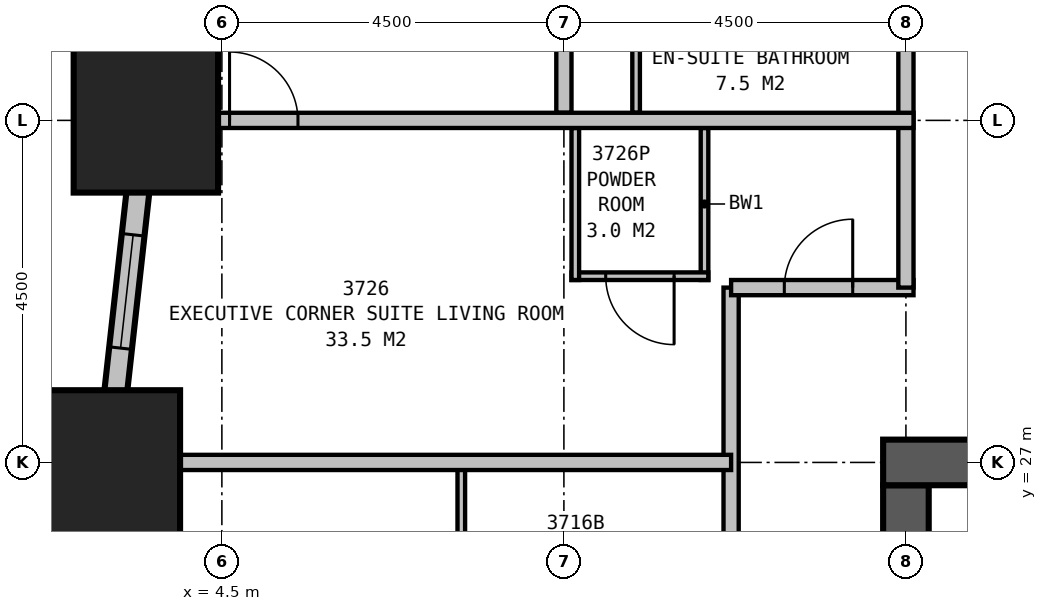
"""IFC4 building model, lengths in metres.
Left out: names, types, materials, properties, quantities, classifications, styles, units other than length and angle.
Written with IfcOpenShell. Run it as: python <this file> out.ifc"""

import sys

from ifc_helpers import new_model, si_unit, direction, frame, frame_2d, origin, origin_2d, place, context, subcontext, project, spatial, rectangle, extrude, element, fill, save


model = new_model("IFC4")
c1 = context("Model", 3, precision=1e-05, world=origin(), true_north=direction((0.0, 1.0)))
c2 = subcontext(c1, "Body", "Model", "MODEL_VIEW")
j1 = project(units=[si_unit("LENGTHUNIT", "METRE"), si_unit("PLANEANGLEUNIT", "RADIAN")], contexts=[c1])
p1 = place(None, origin())
s1 = spatial("IfcSite", under=j1, at=p1, CompositionType="ELEMENT")
p2 = place(p1, origin())
s2 = spatial("IfcBuilding", under=s1, at=p2, CompositionType="ELEMENT")
p3 = place(p2, frame((0.0, 0.0, 142.4)))
s3 = spatial("IfcBuildingStorey", under=s2, at=p3, CompositionType="ELEMENT", Elevation=142.4)
for number, where, z_axis, x_axis in (
    (1, (3.5, 31.5, 0.0), (0.0, 0.0, 1.0), (1.0, 0.0, 0.0)),
    (2, (3.0, 27.0, 0.0), (0.0, 0.0, 1.0), (1.0, 0.0, 0.0)),
):
    element("IfcColumn", number, at=place(p3, frame(where, z_axis=z_axis, x_axis=x_axis)), inside=s3, PredefinedType="COLUMN", context=c2, shape_type="SweptSolid", body=[
        extrude(rectangle(XDim=1.9, YDim=1.9, at=origin_2d()), origin(), (0.0, 0.0, 1.0), 3.5),
    ])
p4 = place(p3, frame((36.3, 27.0, 0.0), z_axis=(0.0, 0.0, 1.0), x_axis=(-1.0, 0.0, 0.0)))
e3 = element("IfcWall", 3, at=p4, inside=s3, PredefinedType="SHEAR", context=c2, shape_type="SweptSolid", body=[
    extrude(rectangle(XDim=23.1, YDim=0.6, at=frame_2d((11.55, 0.0))), origin(), (0.0, 0.0, 1.0), 3.5),
])
p5 = place(p4, frame((17.05, 0.0, 0.0)))
e4 = element("IfcOpeningElement", 4, at=p5, cuts=e3, PredefinedType="OPENING", context=c2, shape_type="SweptSolid", body=[
    extrude(rectangle(XDim=1.0, YDim=2.1, at=frame_2d((0.5, 1.05))), frame((0.0, 0.31, 0.0), z_axis=(0.0, -1.0, 0.0), x_axis=(1.0, 0.0, 0.0)), (0.0, 0.0, 1.0), 0.62),
])
p6 = place(p4, frame((12.05, 0.0, 0.0)))
e5 = element("IfcOpeningElement", 5, at=p6, cuts=e3, PredefinedType="OPENING", context=c2, shape_type="SweptSolid", body=[
    extrude(rectangle(XDim=1.0, YDim=2.1, at=frame_2d((0.5, 1.05))), frame((0.0, 0.31, 0.0), z_axis=(0.0, -1.0, 0.0), x_axis=(1.0, 0.0, 0.0)), (0.0, 0.0, 1.0), 0.62),
])
p7 = place(p4, frame((7.05, 0.0, 0.0)))
e6 = element("IfcOpeningElement", 6, at=p7, cuts=e3, PredefinedType="OPENING", context=c2, shape_type="SweptSolid", body=[
    extrude(rectangle(XDim=1.0, YDim=2.1, at=frame_2d((0.5, 1.05))), frame((0.0, 0.31, 0.0), z_axis=(0.0, -1.0, 0.0), x_axis=(1.0, 0.0, 0.0)), (0.0, 0.0, 1.0), 0.62),
])
p8 = place(p3, frame((13.5, 26.7, 0.0), z_axis=(0.0, 0.0, 1.0), x_axis=(0.0, -1.0, 0.0)))
e7 = element("IfcWall", 7, at=p8, inside=s3, PredefinedType="SHEAR", context=c2, shape_type="SweptSolid", body=[
    extrude(rectangle(XDim=6.7, YDim=0.6, at=frame_2d((3.35, 0.0))), origin(), (0.0, 0.0, 1.0), 3.5),
])
p9 = place(p3, frame((4.017, 36.149, 0.0), z_axis=(0.0, 0.0, 1.0), x_axis=(-0.110433201132, -0.993883548555, 0.0)))
e8 = element("IfcWall", 8, at=p9, inside=s3, PredefinedType="STANDARD", context=c2, shape_type="SweptSolid", body=[
    extrude(rectangle(XDim=31.994, YDim=0.3, at=frame_2d((15.997, 0.0))), origin(), (0.0, 0.0, 1.0), 2.1),
])
p10 = place(p9, frame((1.664, 0.0, 0.5)))
e9 = element("IfcOpeningElement", 9, at=p10, cuts=e8, PredefinedType="OPENING", context=c2, shape_type="SweptSolid", body=[
    extrude(rectangle(XDim=1.5, YDim=1.4, at=frame_2d((0.75, 0.7))), frame((0.0, 0.16, 0.0), z_axis=(0.0, -1.0, 0.0), x_axis=(1.0, 0.0, 0.0)), (0.0, 0.0, 1.0), 0.32),
])
p11 = place(p9, frame((6.192, 0.0, 0.5)))
e10 = element("IfcOpeningElement", 10, at=p11, cuts=e8, PredefinedType="OPENING", context=c2, shape_type="SweptSolid", body=[
    extrude(rectangle(XDim=1.5, YDim=1.4, at=frame_2d((0.75, 0.7))), frame((0.0, 0.16, 0.0), z_axis=(0.0, -1.0, 0.0), x_axis=(1.0, 0.0, 0.0)), (0.0, 0.0, 1.0), 0.32),
])
p12 = place(p9, frame((10.719, 0.0, 0.5)))
e11 = element("IfcOpeningElement", 11, at=p12, cuts=e8, PredefinedType="OPENING", context=c2, shape_type="SweptSolid", body=[
    extrude(rectangle(XDim=1.5, YDim=1.4, at=frame_2d((0.75, 0.7))), frame((0.0, 0.16, 0.0), z_axis=(0.0, -1.0, 0.0), x_axis=(1.0, 0.0, 0.0)), (0.0, 0.0, 1.0), 0.32),
])
p13 = place(p9, frame((15.247, 0.0, 0.5)))
e12 = element("IfcOpeningElement", 12, at=p13, cuts=e8, PredefinedType="OPENING", context=c2, shape_type="SweptSolid", body=[
    extrude(rectangle(XDim=1.5, YDim=1.4, at=frame_2d((0.75, 0.7))), frame((0.0, 0.16, 0.0), z_axis=(0.0, -1.0, 0.0), x_axis=(1.0, 0.0, 0.0)), (0.0, 0.0, 1.0), 0.32),
])
p14 = place(p9, frame((19.775, 0.0, 0.5)))
e13 = element("IfcOpeningElement", 13, at=p14, cuts=e8, PredefinedType="OPENING", context=c2, shape_type="SweptSolid", body=[
    extrude(rectangle(XDim=1.5, YDim=1.4, at=frame_2d((0.75, 0.7))), frame((0.0, 0.16, 0.0), z_axis=(0.0, -1.0, 0.0), x_axis=(1.0, 0.0, 0.0)), (0.0, 0.0, 1.0), 0.32),
])
p15 = place(p9, frame((24.302, 0.0, 0.5)))
e14 = element("IfcOpeningElement", 14, at=p15, cuts=e8, PredefinedType="OPENING", context=c2, shape_type="SweptSolid", body=[
    extrude(rectangle(XDim=1.5, YDim=1.4, at=frame_2d((0.75, 0.7))), frame((0.0, 0.16, 0.0), z_axis=(0.0, -1.0, 0.0), x_axis=(1.0, 0.0, 0.0)), (0.0, 0.0, 1.0), 0.32),
])
p16 = place(p9, frame((28.83, 0.0, 0.5)))
e15 = element("IfcOpeningElement", 15, at=p16, cuts=e8, PredefinedType="OPENING", context=c2, shape_type="SweptSolid", body=[
    extrude(rectangle(XDim=1.5, YDim=1.4, at=frame_2d((0.75, 0.7))), frame((0.0, 0.16, 0.0), z_axis=(0.0, -1.0, 0.0), x_axis=(1.0, 0.0, 0.0)), (0.0, 0.0, 1.0), 0.32),
])
p17 = place(p3, frame((11.2, 29.3, 0.0), z_axis=(0.0, 0.0, 1.0), x_axis=(1.0, 0.0, 0.0)))
e16 = element("IfcWall", 16, at=p17, inside=s3, PredefinedType="PARTITIONING", context=c2, shape_type="SweptSolid", body=[
    extrude(rectangle(XDim=2.4, YDim=0.2, at=frame_2d((1.2, 0.0))), origin(), (0.0, 0.0, 1.0), 3.25),
])
p18 = place(p17, frame((0.7, 0.0, 0.0)))
e17 = element("IfcOpeningElement", 17, at=p18, cuts=e16, PredefinedType="OPENING", context=c2, shape_type="SweptSolid", body=[
    extrude(rectangle(XDim=0.9, YDim=2.1, at=frame_2d((0.45, 1.05))), frame((0.0, 0.11, 0.0), z_axis=(0.0, -1.0, 0.0), x_axis=(1.0, 0.0, 0.0)), (0.0, 0.0, 1.0), 0.22),
])
p19 = place(p3, frame((11.2, 11.2, 0.0), z_axis=(0.0, 0.0, 1.0), x_axis=(0.0, 1.0, 0.0)))
e18 = element("IfcWall", 18, at=p19, inside=s3, PredefinedType="PARTITIONING", context=c2, shape_type="SweptSolid", body=[
    extrude(rectangle(XDim=18.1, YDim=0.2, at=frame_2d((9.05, 0.0))), origin(), (0.0, 0.0, 1.0), 3.25),
])
p20 = place(p19, frame((3.2, 0.0, 0.0)))
e19 = element("IfcOpeningElement", 19, at=p20, cuts=e18, PredefinedType="OPENING", context=c2, shape_type="SweptSolid", body=[
    extrude(rectangle(XDim=1.0, YDim=2.1, at=frame_2d((0.5, 1.05))), frame((0.0, 0.11, 0.0), z_axis=(0.0, -1.0, 0.0), x_axis=(1.0, 0.0, 0.0)), (0.0, 0.0, 1.0), 0.22),
])
p21 = place(p19, frame((7.65, 0.0, 0.0)))
e20 = element("IfcOpeningElement", 20, at=p21, cuts=e18, PredefinedType="OPENING", context=c2, shape_type="SweptSolid", body=[
    extrude(rectangle(XDim=0.9, YDim=2.1, at=frame_2d((0.45, 1.05))), frame((0.0, 0.11, 0.0), z_axis=(0.0, -1.0, 0.0), x_axis=(1.0, 0.0, 0.0)), (0.0, 0.0, 1.0), 0.22),
])
p22 = place(p3, frame((7.65, 24.0, 0.0), z_axis=(0.0, 0.0, 1.0), x_axis=(0.0, 1.0, 0.0)))
e21 = element("IfcWall", 21, at=p22, inside=s3, PredefinedType="PLUMBINGWALL", context=c2, shape_type="SweptSolid", body=[
    extrude(rectangle(XDim=3.0, YDim=0.1, at=frame_2d((1.5, 0.0))), origin(), (0.0, 0.0, 1.0), 3.25),
])
p23 = place(p3, frame((11.2, 27.0, 0.0), z_axis=(0.0, 0.0, 1.0), x_axis=(-1.0, 0.0, 0.0)))
e22 = element("IfcWall", 22, at=p23, inside=s3, PredefinedType="PARTITIONING", context=c2, shape_type="SweptSolid", body=[
    extrude(rectangle(XDim=7.977, YDim=0.2, at=frame_2d((3.988, 0.0))), origin(), (0.0, 0.0, 1.0), 1.9),
])
p24 = place(p3, frame((13.5, 29.3, 0.0), z_axis=(0.0, 0.0, 1.0), x_axis=(0.0, 1.0, 0.0)))
e23 = element("IfcWall", 23, at=p24, inside=s3, PredefinedType="PARTITIONING", context=c2, shape_type="SweptSolid", body=[
    extrude(rectangle(XDim=11.2, YDim=0.2, at=frame_2d((5.6, 0.0))), origin(), (0.0, 0.0, 1.0), 2.2),
])
p25 = place(p3, frame((13.6, 31.5, 0.0), z_axis=(0.0, 0.0, 1.0), x_axis=(-1.0, 0.0, 0.0)))
e24 = element("IfcWall", 24, at=p25, inside=s3, PredefinedType="PARTITIONING", context=c2, shape_type="SweptSolid", body=[
    extrude(rectangle(XDim=10.099, YDim=0.2, at=frame_2d((5.05, 0.0))), origin(), (0.0, 0.0, 1.0), 3.25),
])
p26 = place(p25, frame((8.999, 0.0, 0.0), z_axis=(0.0, 0.0, 1.0), x_axis=(-1.0, 0.0, 0.0)))
e25 = element("IfcOpeningElement", 25, at=p26, cuts=e24, PredefinedType="OPENING", context=c2, shape_type="SweptSolid", body=[
    extrude(rectangle(XDim=0.9, YDim=2.1, at=frame_2d((0.45, 1.05))), frame((0.0, 0.11, 0.0), z_axis=(0.0, -1.0, 0.0), x_axis=(1.0, 0.0, 0.0)), (0.0, 0.0, 1.0), 0.22),
])
p27 = place(p3, frame((9.15, 31.4, 0.0), z_axis=(0.0, 0.0, 1.0), x_axis=(0.0, -1.0, 0.0)))
e26 = element("IfcWall", 26, at=p27, inside=s3, PredefinedType="PLUMBINGWALL", context=c2, shape_type="SweptSolid", body=[
    extrude(rectangle(XDim=2.0, YDim=0.1, at=frame_2d((1.0, 0.0))), origin(), (0.0, 0.0, 1.0), 2.2),
])
p28 = place(p3, frame((10.85, 31.4, 0.0), z_axis=(0.0, 0.0, 1.0), x_axis=(0.0, -1.0, 0.0)))
e27 = element("IfcWall", 27, at=p28, inside=s3, PredefinedType="PLUMBINGWALL", context=c2, shape_type="SweptSolid", body=[
    extrude(rectangle(XDim=2.0, YDim=0.1, at=frame_2d((1.0, 0.0))), origin(), (0.0, 0.0, 1.0), 3.25),
])
p29 = place(p3, frame((10.9, 29.45, 0.0), z_axis=(0.0, 0.0, 1.0), x_axis=(-1.0, 0.0, 0.0)))
e28 = element("IfcWall", 28, at=p29, inside=s3, PredefinedType="PLUMBINGWALL", context=c2, shape_type="SweptSolid", body=[
    extrude(rectangle(XDim=1.8, YDim=0.1, at=frame_2d((0.9, 0.0))), origin(), (0.0, 0.0, 1.0), 3.25),
])
p30 = place(p29, frame((0.45, 0.0, 0.0)))
e29 = element("IfcOpeningElement", 29, at=p30, cuts=e28, PredefinedType="OPENING", context=c2, shape_type="SweptSolid", body=[
    extrude(rectangle(XDim=0.9, YDim=2.1, at=frame_2d((0.45, 1.05))), frame((0.0, 0.06, 0.0), z_axis=(0.0, -1.0, 0.0), x_axis=(1.0, 0.0, 0.0)), (0.0, 0.0, 1.0), 0.12),
])
p31 = place(p3, frame((9.0, 31.6, 0.0), z_axis=(0.0, 0.0, 1.0), x_axis=(0.0, 1.0, 0.0)))
e30 = element("IfcWall", 30, at=p31, inside=s3, PredefinedType="PARTITIONING", context=c2, shape_type="SweptSolid", body=[
    extrude(rectangle(XDim=4.4, YDim=0.2, at=frame_2d((2.2, 0.0))), origin(), (0.0, 0.0, 1.0), 2.2),
])
p32 = place(p31, frame((3.3, 0.0, 0.0), z_axis=(0.0, 0.0, 1.0), x_axis=(-1.0, 0.0, 0.0)))
e31 = element("IfcOpeningElement", 31, at=p32, cuts=e30, PredefinedType="OPENING", context=c2, shape_type="SweptSolid", body=[
    extrude(rectangle(XDim=0.9, YDim=2.1, at=frame_2d((0.45, 1.05))), frame((0.0, 0.11, 0.0), z_axis=(0.0, -1.0, 0.0), x_axis=(1.0, 0.0, 0.0)), (0.0, 0.0, 1.0), 0.22),
])
p33 = place(p3, frame((9.95, 31.6, 0.0), z_axis=(0.0, 0.0, 1.0), x_axis=(0.0, 1.0, 0.0)))
e32 = element("IfcWall", 32, at=p33, inside=s3, PredefinedType="PLUMBINGWALL", context=c2, shape_type="SweptSolid", body=[
    extrude(rectangle(XDim=2.3, YDim=0.1, at=frame_2d((1.15, 0.0))), origin(), (0.0, 0.0, 1.0), 3.25),
])
p34 = place(p11, origin())
e33 = element("IfcWindow", 33, at=p34, inside=s3, PartitioningType="SINGLE_PANEL", PredefinedType="WINDOW", context=c2, shape_type="SweptSolid", body=[
    extrude(rectangle(XDim=1.5, YDim=1.4, at=frame_2d((0.75, 0.7))), frame((0.0, 0.03, 0.0), z_axis=(0.0, -1.0, 0.0), x_axis=(1.0, 0.0, 0.0)), (0.0, 0.0, 1.0), 0.06),
])
fill(e10, e33)
p35 = place(p18, origin())
e34 = element("IfcDoor", 34, at=p35, inside=s3, OperationType="SINGLE_SWING_RIGHT", PredefinedType="DOOR", context=c2, shape_type="SweptSolid", body=[
    extrude(rectangle(XDim=0.9, YDim=2.1, at=frame_2d((0.45, 1.05))), frame((0.0, 0.025, 0.0), z_axis=(0.0, -1.0, 0.0), x_axis=(1.0, 0.0, 0.0)), (0.0, 0.0, 1.0), 0.05),
])
fill(e17, e34)
p36 = place(p26, origin())
e35 = element("IfcDoor", 35, at=p36, inside=s3, OperationType="SINGLE_SWING_LEFT", PredefinedType="DOOR", context=c2, shape_type="SweptSolid", body=[
    extrude(rectangle(XDim=0.9, YDim=2.1, at=frame_2d((0.45, 1.05))), frame((0.0, 0.025, 0.0), z_axis=(0.0, -1.0, 0.0), x_axis=(1.0, 0.0, 0.0)), (0.0, 0.0, 1.0), 0.05),
])
fill(e25, e35)
p37 = place(p30, origin())
e36 = element("IfcDoor", 36, at=p37, inside=s3, OperationType="SINGLE_SWING_LEFT", PredefinedType="DOOR", context=c2, shape_type="SweptSolid", body=[
    extrude(rectangle(XDim=0.9, YDim=2.1, at=frame_2d((0.45, 1.05))), frame((0.0, 0.025, 0.0), z_axis=(0.0, -1.0, 0.0), x_axis=(1.0, 0.0, 0.0)), (0.0, 0.0, 1.0), 0.05),
])
fill(e29, e36)
save(model, sys.argv[1])
